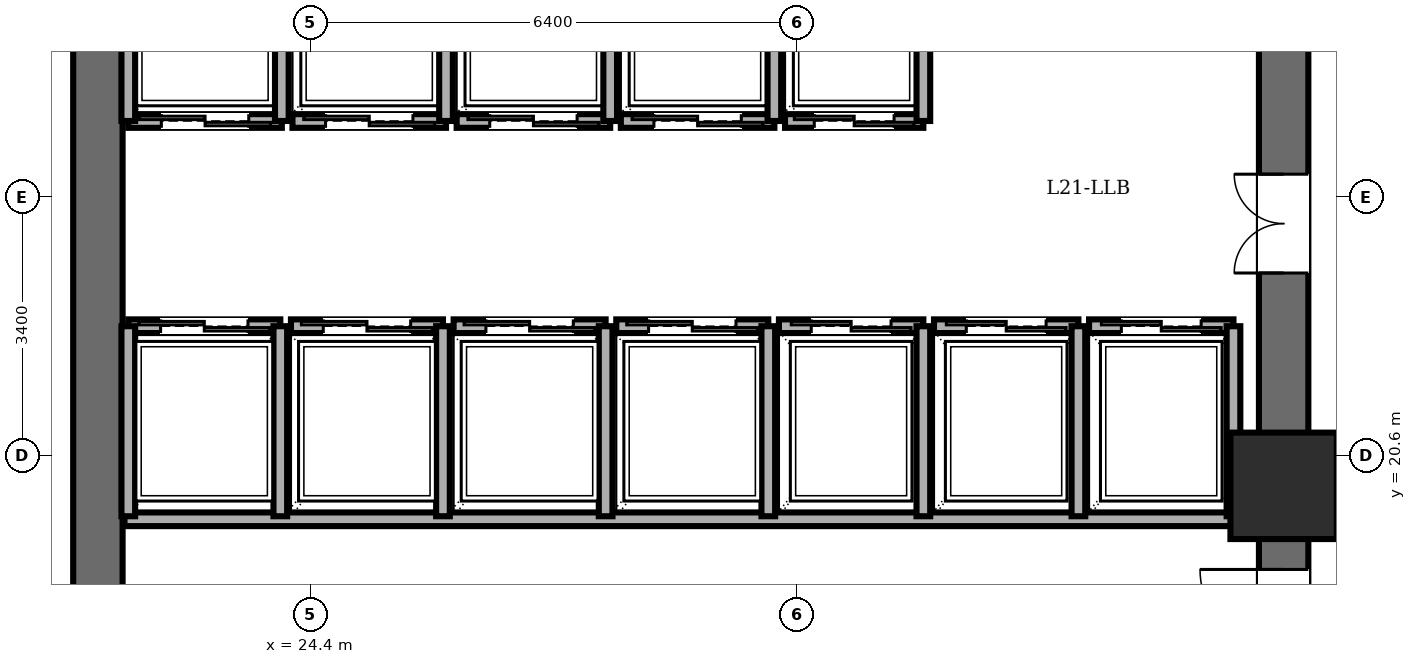
"""IFC4 building model, lengths in metres.
Left out: names, types, materials, properties, quantities, classifications, styles, units other than length and angle.
Written with IfcOpenShell. Run it as: python <this file> out.ifc"""

import sys

from ifc_helpers import new_model, si_unit, direction, frame, frame_2d, origin, origin_2d, place, context, subcontext, project, spatial, rectangle, extrude, element, fill, save


model = new_model("IFC4")
c1 = context("Model", 3, precision=1e-05, world=origin(), true_north=direction((0.0, 1.0)))
c2 = subcontext(c1, "Body", "Model", "MODEL_VIEW")
j1 = project(units=[si_unit("LENGTHUNIT", "METRE"), si_unit("PLANEANGLEUNIT", "RADIAN")], contexts=[c1])
p1 = place(None, origin())
s1 = spatial("IfcSite", under=j1, at=p1, CompositionType="ELEMENT")
p2 = place(p1, origin())
s2 = spatial("IfcBuilding", under=s1, at=p2, CompositionType="ELEMENT")
p3 = place(p2, frame((0.0, 0.0, 81.2)))
s3 = spatial("IfcBuildingStorey", under=s2, at=p3, CompositionType="ELEMENT", Elevation=81.2)
p4 = place(p3, frame((37.2, 20.2, 0.0), z_axis=(0.0, 0.0, 1.0), x_axis=(1.0, 0.0, 0.0)))
e1 = element("IfcColumn", 1, at=p4, inside=s3, PredefinedType="COLUMN", context=c2, shape_type="SweptSolid", body=[
    extrude(rectangle(XDim=1.4, YDim=1.4, at=origin_2d()), origin(), (0.0, 0.0, 1.0), 5.1),
])
p5 = place(p3, frame((21.6, 14.4, 0.0), z_axis=(0.0, 0.0, 1.0), x_axis=(0.0, 1.0, 0.0)))
e2 = element("IfcWall", 2, at=p5, inside=s3, PredefinedType="SHEAR", context=c2, shape_type="SweptSolid", body=[
    extrude(rectangle(XDim=19.2, YDim=0.65, at=frame_2d((9.6, 0.0))), origin(), (0.0, 0.0, 1.0), 4.9),
])
p6 = place(p3, frame((37.2, 14.4, 0.0), z_axis=(0.0, 0.0, 1.0), x_axis=(0.0, 1.0, 0.0)))
e3 = element("IfcWall", 3, at=p6, inside=s3, PredefinedType="SHEAR", context=c2, shape_type="SweptSolid", body=[
    extrude(rectangle(XDim=19.2, YDim=0.65, at=frame_2d((9.6, 0.0))), origin(), (0.0, 0.0, 1.0), 4.9),
])
p7 = place(p6, frame((15.8, 0.0, 0.0)))
e4 = element("IfcOpeningElement", 4, at=p7, cuts=e3, PredefinedType="OPENING", context=c2, shape_type="SweptSolid", body=[
    extrude(rectangle(XDim=1.15, YDim=2.15, at=frame_2d((0.575, 1.075))), frame((0.0, 0.335, 0.0), z_axis=(0.0, -1.0, 0.0), x_axis=(1.0, 0.0, 0.0)), (0.0, 0.0, 1.0), 0.67),
])
p8 = place(p6, frame((3.6, 0.0, 0.0)))
e5 = element("IfcOpeningElement", 5, at=p8, cuts=e3, PredefinedType="OPENING", context=c2, shape_type="SweptSolid", body=[
    extrude(rectangle(XDim=1.1, YDim=2.15, at=frame_2d((0.55, 1.075))), frame((0.0, 0.335, 0.0), z_axis=(0.0, -1.0, 0.0), x_axis=(1.0, 0.0, 0.0)), (0.0, 0.0, 1.0), 0.67),
])
p9 = place(p6, frame((8.6, 0.0, 0.0)))
e6 = element("IfcOpeningElement", 6, at=p9, cuts=e3, PredefinedType="OPENING", context=c2, shape_type="SweptSolid", body=[
    extrude(rectangle(XDim=1.3, YDim=2.2, at=frame_2d((0.65, 1.1))), frame((0.0, 0.335, 0.0), z_axis=(0.0, -1.0, 0.0), x_axis=(1.0, 0.0, 0.0)), (0.0, 0.0, 1.0), 0.67),
])
p10 = place(p3, frame((21.95, 19.76, 0.0), z_axis=(0.0, 0.0, 1.0), x_axis=(1.0, 0.0, 0.0)))
e7 = element("IfcWall", 7, at=p10, inside=s3, PredefinedType="PARTITIONING", context=c2, shape_type="SweptSolid", body=[
    extrude(rectangle(XDim=14.87, YDim=0.18, at=frame_2d((7.435, 0.0))), origin(), (0.0, 0.0, 1.0), 4.9),
])
p11 = place(p3, frame((24.02, 25.0, 0.0), z_axis=(0.0, 0.0, 1.0), x_axis=(-1.0, 0.0, 0.0)))
e8 = element("IfcWall", 8, at=p11, inside=s3, PredefinedType="PARTITIONING", context=c2, shape_type="SweptSolid", body=[
    extrude(rectangle(XDim=2.02, YDim=0.18, at=frame_2d((1.01, 0.0))), origin(), (0.0, 0.0, 1.0), 4.9),
])
p12 = place(p11, frame((0.435, 0.0, 0.0)))
e9 = element("IfcOpeningElement", 9, at=p12, cuts=e8, PredefinedType="OPENING", context=c2, shape_type="SweptSolid", body=[
    extrude(rectangle(XDim=1.15, YDim=2.2, at=frame_2d((0.575, 1.1))), frame((0.0, 0.1, 0.0), z_axis=(0.0, -1.0, 0.0), x_axis=(1.0, 0.0, 0.0)), (0.0, 0.0, 1.0), 0.2),
])
for number, where, z_axis, x_axis in (
    (10, (24.02, 25.0, 0.0), (0.0, 0.0, 1.0), (0.0, 1.0, 0.0)),
    (11, (22.0, 27.5, 0.0), (0.0, 0.0, 1.0), (0.0, -1.0, 0.0)),
):
    element("IfcWall", number, at=place(p3, frame(where, z_axis=z_axis, x_axis=x_axis)), inside=s3, PredefinedType="PARTITIONING", context=c2, shape_type="SweptSolid", body=[
        extrude(rectangle(XDim=2.5, YDim=0.18, at=frame_2d((1.25, 0.0))), origin(), (0.0, 0.0, 1.0), 4.9),
    ])
p13 = place(p3, frame((26.18, 25.0, 0.0), z_axis=(0.0, 0.0, 1.0), x_axis=(-1.0, 0.0, 0.0)))
e12 = element("IfcWall", 12, at=p13, inside=s3, PredefinedType="PARTITIONING", context=c2, shape_type="SweptSolid", body=[
    extrude(rectangle(XDim=2.02, YDim=0.18, at=frame_2d((1.01, 0.0))), origin(), (0.0, 0.0, 1.0), 4.9),
])
p14 = place(p13, frame((0.435, 0.0, 0.0)))
e13 = element("IfcOpeningElement", 13, at=p14, cuts=e12, PredefinedType="OPENING", context=c2, shape_type="SweptSolid", body=[
    extrude(rectangle(XDim=1.15, YDim=2.2, at=frame_2d((0.575, 1.1))), frame((0.0, 0.1, 0.0), z_axis=(0.0, -1.0, 0.0), x_axis=(1.0, 0.0, 0.0)), (0.0, 0.0, 1.0), 0.2),
])
p15 = place(p3, frame((26.18, 25.0, 0.0), z_axis=(0.0, 0.0, 1.0), x_axis=(0.0, 1.0, 0.0)))
e14 = element("IfcWall", 14, at=p15, inside=s3, PredefinedType="PARTITIONING", context=c2, shape_type="SweptSolid", body=[
    extrude(rectangle(XDim=2.5, YDim=0.18, at=frame_2d((1.25, 0.0))), origin(), (0.0, 0.0, 1.0), 4.9),
])
p16 = place(p3, frame((22.0, 22.3, 0.0), z_axis=(0.0, 0.0, 1.0), x_axis=(1.0, 0.0, 0.0)))
e15 = element("IfcWall", 15, at=p16, inside=s3, PredefinedType="PARTITIONING", context=c2, shape_type="SweptSolid", body=[
    extrude(rectangle(XDim=2.0, YDim=0.18, at=frame_2d((1.0, 0.0))), origin(), (0.0, 0.0, 1.0), 4.9),
])
p17 = place(p16, frame((0.425, 0.0, 0.0)))
e16 = element("IfcOpeningElement", 16, at=p17, cuts=e15, PredefinedType="OPENING", context=c2, shape_type="SweptSolid", body=[
    extrude(rectangle(XDim=1.15, YDim=2.2, at=frame_2d((0.575, 1.1))), frame((0.0, 0.1, 0.0), z_axis=(0.0, -1.0, 0.0), x_axis=(1.0, 0.0, 0.0)), (0.0, 0.0, 1.0), 0.2),
])
for number, where, z_axis, x_axis in (
    (17, (24.0, 19.8, 0.0), (0.0, 0.0, 1.0), (0.0, 1.0, 0.0)),
    (18, (22.0, 22.3, 0.0), (0.0, 0.0, 1.0), (0.0, -1.0, 0.0)),
):
    element("IfcWall", number, at=place(p3, frame(where, z_axis=z_axis, x_axis=x_axis)), inside=s3, PredefinedType="PARTITIONING", context=c2, shape_type="SweptSolid", body=[
        extrude(rectangle(XDim=2.5, YDim=0.18, at=frame_2d((1.25, 0.0))), origin(), (0.0, 0.0, 1.0), 4.9),
    ])
p18 = place(p3, frame((24.14, 22.3, 0.0), z_axis=(0.0, 0.0, 1.0), x_axis=(1.0, 0.0, 0.0)))
e19 = element("IfcWall", 19, at=p18, inside=s3, PredefinedType="PARTITIONING", context=c2, shape_type="SweptSolid", body=[
    extrude(rectangle(XDim=2.0, YDim=0.18, at=frame_2d((1.0, 0.0))), origin(), (0.0, 0.0, 1.0), 4.9),
])
p19 = place(p18, frame((0.425, 0.0, 0.0)))
e20 = element("IfcOpeningElement", 20, at=p19, cuts=e19, PredefinedType="OPENING", context=c2, shape_type="SweptSolid", body=[
    extrude(rectangle(XDim=1.15, YDim=2.2, at=frame_2d((0.575, 1.1))), frame((0.0, 0.1, 0.0), z_axis=(0.0, -1.0, 0.0), x_axis=(1.0, 0.0, 0.0)), (0.0, 0.0, 1.0), 0.2),
])
p20 = place(p3, frame((26.14, 19.8, 0.0), z_axis=(0.0, 0.0, 1.0), x_axis=(0.0, 1.0, 0.0)))
e21 = element("IfcWall", 21, at=p20, inside=s3, PredefinedType="PARTITIONING", context=c2, shape_type="SweptSolid", body=[
    extrude(rectangle(XDim=2.5, YDim=0.18, at=frame_2d((1.25, 0.0))), origin(), (0.0, 0.0, 1.0), 4.9),
])
p21 = place(p3, frame((28.34, 25.0, 0.0), z_axis=(0.0, 0.0, 1.0), x_axis=(-1.0, 0.0, 0.0)))
e22 = element("IfcWall", 22, at=p21, inside=s3, PredefinedType="PARTITIONING", context=c2, shape_type="SweptSolid", body=[
    extrude(rectangle(XDim=2.02, YDim=0.18, at=frame_2d((1.01, 0.0))), origin(), (0.0, 0.0, 1.0), 4.9),
])
p22 = place(p21, frame((0.435, 0.0, 0.0)))
e23 = element("IfcOpeningElement", 23, at=p22, cuts=e22, PredefinedType="OPENING", context=c2, shape_type="SweptSolid", body=[
    extrude(rectangle(XDim=1.15, YDim=2.2, at=frame_2d((0.575, 1.1))), frame((0.0, 0.1, 0.0), z_axis=(0.0, -1.0, 0.0), x_axis=(1.0, 0.0, 0.0)), (0.0, 0.0, 1.0), 0.2),
])
p23 = place(p3, frame((28.34, 25.0, 0.0), z_axis=(0.0, 0.0, 1.0), x_axis=(0.0, 1.0, 0.0)))
e24 = element("IfcWall", 24, at=p23, inside=s3, PredefinedType="PARTITIONING", context=c2, shape_type="SweptSolid", body=[
    extrude(rectangle(XDim=2.5, YDim=0.18, at=frame_2d((1.25, 0.0))), origin(), (0.0, 0.0, 1.0), 4.9),
])
p24 = place(p3, frame((30.5, 25.0, 0.0), z_axis=(0.0, 0.0, 1.0), x_axis=(-1.0, 0.0, 0.0)))
e25 = element("IfcWall", 25, at=p24, inside=s3, PredefinedType="PARTITIONING", context=c2, shape_type="SweptSolid", body=[
    extrude(rectangle(XDim=2.02, YDim=0.18, at=frame_2d((1.01, 0.0))), origin(), (0.0, 0.0, 1.0), 4.9),
])
p25 = place(p24, frame((0.435, 0.0, 0.0)))
e26 = element("IfcOpeningElement", 26, at=p25, cuts=e25, PredefinedType="OPENING", context=c2, shape_type="SweptSolid", body=[
    extrude(rectangle(XDim=1.15, YDim=2.2, at=frame_2d((0.575, 1.1))), frame((0.0, 0.1, 0.0), z_axis=(0.0, -1.0, 0.0), x_axis=(1.0, 0.0, 0.0)), (0.0, 0.0, 1.0), 0.2),
])
p26 = place(p3, frame((30.5, 25.0, 0.0), z_axis=(0.0, 0.0, 1.0), x_axis=(0.0, 1.0, 0.0)))
e27 = element("IfcWall", 27, at=p26, inside=s3, PredefinedType="PARTITIONING", context=c2, shape_type="SweptSolid", body=[
    extrude(rectangle(XDim=2.5, YDim=0.18, at=frame_2d((1.25, 0.0))), origin(), (0.0, 0.0, 1.0), 4.9),
])
p27 = place(p3, frame((26.28, 22.3, 0.0), z_axis=(0.0, 0.0, 1.0), x_axis=(1.0, 0.0, 0.0)))
e28 = element("IfcWall", 28, at=p27, inside=s3, PredefinedType="PARTITIONING", context=c2, shape_type="SweptSolid", body=[
    extrude(rectangle(XDim=2.0, YDim=0.18, at=frame_2d((1.0, 0.0))), origin(), (0.0, 0.0, 1.0), 4.9),
])
p28 = place(p27, frame((0.425, 0.0, 0.0)))
e29 = element("IfcOpeningElement", 29, at=p28, cuts=e28, PredefinedType="OPENING", context=c2, shape_type="SweptSolid", body=[
    extrude(rectangle(XDim=1.15, YDim=2.2, at=frame_2d((0.575, 1.1))), frame((0.0, 0.1, 0.0), z_axis=(0.0, -1.0, 0.0), x_axis=(1.0, 0.0, 0.0)), (0.0, 0.0, 1.0), 0.2),
])
p29 = place(p3, frame((28.28, 19.8, 0.0), z_axis=(0.0, 0.0, 1.0), x_axis=(0.0, 1.0, 0.0)))
e30 = element("IfcWall", 30, at=p29, inside=s3, PredefinedType="PARTITIONING", context=c2, shape_type="SweptSolid", body=[
    extrude(rectangle(XDim=2.5, YDim=0.18, at=frame_2d((1.25, 0.0))), origin(), (0.0, 0.0, 1.0), 4.9),
])
p30 = place(p3, frame((28.42, 22.3, 0.0), z_axis=(0.0, 0.0, 1.0), x_axis=(1.0, 0.0, 0.0)))
e31 = element("IfcWall", 31, at=p30, inside=s3, PredefinedType="PARTITIONING", context=c2, shape_type="SweptSolid", body=[
    extrude(rectangle(XDim=2.0, YDim=0.18, at=frame_2d((1.0, 0.0))), origin(), (0.0, 0.0, 1.0), 4.9),
])
p31 = place(p30, frame((0.425, 0.0, 0.0)))
e32 = element("IfcOpeningElement", 32, at=p31, cuts=e31, PredefinedType="OPENING", context=c2, shape_type="SweptSolid", body=[
    extrude(rectangle(XDim=1.15, YDim=2.2, at=frame_2d((0.575, 1.1))), frame((0.0, 0.1, 0.0), z_axis=(0.0, -1.0, 0.0), x_axis=(1.0, 0.0, 0.0)), (0.0, 0.0, 1.0), 0.2),
])
p32 = place(p3, frame((30.42, 19.8, 0.0), z_axis=(0.0, 0.0, 1.0), x_axis=(0.0, 1.0, 0.0)))
e33 = element("IfcWall", 33, at=p32, inside=s3, PredefinedType="PARTITIONING", context=c2, shape_type="SweptSolid", body=[
    extrude(rectangle(XDim=2.5, YDim=0.18, at=frame_2d((1.25, 0.0))), origin(), (0.0, 0.0, 1.0), 4.9),
])
p33 = place(p3, frame((32.46, 25.0, 0.0), z_axis=(0.0, 0.0, 1.0), x_axis=(-1.0, 0.0, 0.0)))
e34 = element("IfcWall", 34, at=p33, inside=s3, PredefinedType="PARTITIONING", context=c2, shape_type="SweptSolid", body=[
    extrude(rectangle(XDim=1.82, YDim=0.18, at=frame_2d((0.91, 0.0))), origin(), (0.0, 0.0, 1.0), 4.9),
])
p34 = place(p33, frame((0.385, 0.0, 0.0)))
e35 = element("IfcOpeningElement", 35, at=p34, cuts=e34, PredefinedType="OPENING", context=c2, shape_type="SweptSolid", body=[
    extrude(rectangle(XDim=1.05, YDim=2.2, at=frame_2d((0.525, 1.1))), frame((0.0, 0.1, 0.0), z_axis=(0.0, -1.0, 0.0), x_axis=(1.0, 0.0, 0.0)), (0.0, 0.0, 1.0), 0.2),
])
p35 = place(p3, frame((32.46, 25.0, 0.0), z_axis=(0.0, 0.0, 1.0), x_axis=(0.0, 1.0, 0.0)))
e36 = element("IfcWall", 36, at=p35, inside=s3, PredefinedType="PARTITIONING", context=c2, shape_type="SweptSolid", body=[
    extrude(rectangle(XDim=2.5, YDim=0.18, at=frame_2d((1.25, 0.0))), origin(), (0.0, 0.0, 1.0), 4.9),
])
p36 = place(p3, frame((30.56, 22.3, 0.0), z_axis=(0.0, 0.0, 1.0), x_axis=(1.0, 0.0, 0.0)))
e37 = element("IfcWall", 37, at=p36, inside=s3, PredefinedType="PARTITIONING", context=c2, shape_type="SweptSolid", body=[
    extrude(rectangle(XDim=1.9, YDim=0.18, at=frame_2d((0.95, 0.0))), origin(), (0.0, 0.0, 1.0), 4.9),
])
p37 = place(p36, frame((0.425, 0.0, 0.0)))
e38 = element("IfcOpeningElement", 38, at=p37, cuts=e37, PredefinedType="OPENING", context=c2, shape_type="SweptSolid", body=[
    extrude(rectangle(XDim=1.05, YDim=2.2, at=frame_2d((0.525, 1.1))), frame((0.0, 0.1, 0.0), z_axis=(0.0, -1.0, 0.0), x_axis=(1.0, 0.0, 0.0)), (0.0, 0.0, 1.0), 0.2),
])
p38 = place(p3, frame((32.46, 19.8, 0.0), z_axis=(0.0, 0.0, 1.0), x_axis=(0.0, 1.0, 0.0)))
e39 = element("IfcWall", 39, at=p38, inside=s3, PredefinedType="PARTITIONING", context=c2, shape_type="SweptSolid", body=[
    extrude(rectangle(XDim=2.5, YDim=0.18, at=frame_2d((1.25, 0.0))), origin(), (0.0, 0.0, 1.0), 4.9),
])
p39 = place(p3, frame((32.6, 22.3, 0.0), z_axis=(0.0, 0.0, 1.0), x_axis=(1.0, 0.0, 0.0)))
e40 = element("IfcWall", 40, at=p39, inside=s3, PredefinedType="PARTITIONING", context=c2, shape_type="SweptSolid", body=[
    extrude(rectangle(XDim=1.9, YDim=0.18, at=frame_2d((0.95, 0.0))), origin(), (0.0, 0.0, 1.0), 4.9),
])
p40 = place(p39, frame((0.425, 0.0, 0.0)))
e41 = element("IfcOpeningElement", 41, at=p40, cuts=e40, PredefinedType="OPENING", context=c2, shape_type="SweptSolid", body=[
    extrude(rectangle(XDim=1.05, YDim=2.2, at=frame_2d((0.525, 1.1))), frame((0.0, 0.1, 0.0), z_axis=(0.0, -1.0, 0.0), x_axis=(1.0, 0.0, 0.0)), (0.0, 0.0, 1.0), 0.2),
])
p41 = place(p3, frame((34.5, 19.8, 0.0), z_axis=(0.0, 0.0, 1.0), x_axis=(0.0, 1.0, 0.0)))
e42 = element("IfcWall", 42, at=p41, inside=s3, PredefinedType="PARTITIONING", context=c2, shape_type="SweptSolid", body=[
    extrude(rectangle(XDim=2.5, YDim=0.18, at=frame_2d((1.25, 0.0))), origin(), (0.0, 0.0, 1.0), 4.9),
])
p42 = place(p3, frame((34.64, 22.3, 0.0), z_axis=(0.0, 0.0, 1.0), x_axis=(1.0, 0.0, 0.0)))
e43 = element("IfcWall", 43, at=p42, inside=s3, PredefinedType="PARTITIONING", context=c2, shape_type="SweptSolid", body=[
    extrude(rectangle(XDim=1.9, YDim=0.18, at=frame_2d((0.95, 0.0))), origin(), (0.0, 0.0, 1.0), 4.9),
])
p43 = place(p42, frame((0.425, 0.0, 0.0)))
e44 = element("IfcOpeningElement", 44, at=p43, cuts=e43, PredefinedType="OPENING", context=c2, shape_type="SweptSolid", body=[
    extrude(rectangle(XDim=1.05, YDim=2.2, at=frame_2d((0.525, 1.1))), frame((0.0, 0.1, 0.0), z_axis=(0.0, -1.0, 0.0), x_axis=(1.0, 0.0, 0.0)), (0.0, 0.0, 1.0), 0.2),
])
p44 = place(p3, frame((36.54, 19.8, 0.0), z_axis=(0.0, 0.0, 1.0), x_axis=(0.0, 1.0, 0.0)))
e45 = element("IfcWall", 45, at=p44, inside=s3, PredefinedType="PARTITIONING", context=c2, shape_type="SweptSolid", body=[
    extrude(rectangle(XDim=2.5, YDim=0.18, at=frame_2d((1.25, 0.0))), origin(), (0.0, 0.0, 1.0), 4.9),
])
p45 = place(p8, origin())
e46 = element("IfcDoor", 46, at=p45, inside=s3, OperationType="SINGLE_SWING_RIGHT", PredefinedType="DOOR", context=c2, shape_type="SweptSolid", body=[
    extrude(rectangle(XDim=1.1, YDim=2.15, at=frame_2d((0.55, 1.075))), frame((0.0, 0.025, 0.0), z_axis=(0.0, -1.0, 0.0), x_axis=(1.0, 0.0, 0.0)), (0.0, 0.0, 1.0), 0.05),
])
fill(e5, e46)
p46 = place(p12, origin())
e47 = element("IfcDoor", 47, at=p46, inside=s3, OperationType="DOUBLE_DOOR_SLIDING", PredefinedType="DOOR", context=c2, shape_type="SweptSolid", body=[
    extrude(rectangle(XDim=1.15, YDim=2.2, at=frame_2d((0.575, 1.1))), frame((0.0, 0.025, 0.0), z_axis=(0.0, -1.0, 0.0), x_axis=(1.0, 0.0, 0.0)), (0.0, 0.0, 1.0), 0.05),
])
fill(e9, e47)
p47 = place(p14, origin())
e48 = element("IfcDoor", 48, at=p47, inside=s3, OperationType="DOUBLE_DOOR_SLIDING", PredefinedType="DOOR", context=c2, shape_type="SweptSolid", body=[
    extrude(rectangle(XDim=1.15, YDim=2.2, at=frame_2d((0.575, 1.1))), frame((0.0, 0.025, 0.0), z_axis=(0.0, -1.0, 0.0), x_axis=(1.0, 0.0, 0.0)), (0.0, 0.0, 1.0), 0.05),
])
fill(e13, e48)
p48 = place(p17, origin())
e49 = element("IfcDoor", 49, at=p48, inside=s3, OperationType="DOUBLE_DOOR_SLIDING", PredefinedType="DOOR", context=c2, shape_type="SweptSolid", body=[
    extrude(rectangle(XDim=1.15, YDim=2.2, at=frame_2d((0.575, 1.1))), frame((0.0, 0.025, 0.0), z_axis=(0.0, -1.0, 0.0), x_axis=(1.0, 0.0, 0.0)), (0.0, 0.0, 1.0), 0.05),
])
fill(e16, e49)
p49 = place(p19, origin())
e50 = element("IfcDoor", 50, at=p49, inside=s3, OperationType="DOUBLE_DOOR_SLIDING", PredefinedType="DOOR", context=c2, shape_type="SweptSolid", body=[
    extrude(rectangle(XDim=1.15, YDim=2.2, at=frame_2d((0.575, 1.1))), frame((0.0, 0.025, 0.0), z_axis=(0.0, -1.0, 0.0), x_axis=(1.0, 0.0, 0.0)), (0.0, 0.0, 1.0), 0.05),
])
fill(e20, e50)
p50 = place(p22, origin())
e51 = element("IfcDoor", 51, at=p50, inside=s3, OperationType="DOUBLE_DOOR_SLIDING", PredefinedType="DOOR", context=c2, shape_type="SweptSolid", body=[
    extrude(rectangle(XDim=1.15, YDim=2.2, at=frame_2d((0.575, 1.1))), frame((0.0, 0.025, 0.0), z_axis=(0.0, -1.0, 0.0), x_axis=(1.0, 0.0, 0.0)), (0.0, 0.0, 1.0), 0.05),
])
fill(e23, e51)
p51 = place(p25, origin())
e52 = element("IfcDoor", 52, at=p51, inside=s3, OperationType="DOUBLE_DOOR_SLIDING", PredefinedType="DOOR", context=c2, shape_type="SweptSolid", body=[
    extrude(rectangle(XDim=1.15, YDim=2.2, at=frame_2d((0.575, 1.1))), frame((0.0, 0.025, 0.0), z_axis=(0.0, -1.0, 0.0), x_axis=(1.0, 0.0, 0.0)), (0.0, 0.0, 1.0), 0.05),
])
fill(e26, e52)
p52 = place(p28, origin())
e53 = element("IfcDoor", 53, at=p52, inside=s3, OperationType="DOUBLE_DOOR_SLIDING", PredefinedType="DOOR", context=c2, shape_type="SweptSolid", body=[
    extrude(rectangle(XDim=1.15, YDim=2.2, at=frame_2d((0.575, 1.1))), frame((0.0, 0.025, 0.0), z_axis=(0.0, -1.0, 0.0), x_axis=(1.0, 0.0, 0.0)), (0.0, 0.0, 1.0), 0.05),
])
fill(e29, e53)
p53 = place(p31, origin())
e54 = element("IfcDoor", 54, at=p53, inside=s3, OperationType="DOUBLE_DOOR_SLIDING", PredefinedType="DOOR", context=c2, shape_type="SweptSolid", body=[
    extrude(rectangle(XDim=1.15, YDim=2.2, at=frame_2d((0.575, 1.1))), frame((0.0, 0.025, 0.0), z_axis=(0.0, -1.0, 0.0), x_axis=(1.0, 0.0, 0.0)), (0.0, 0.0, 1.0), 0.05),
])
fill(e32, e54)
p54 = place(p34, origin())
e55 = element("IfcDoor", 55, at=p54, inside=s3, OperationType="DOUBLE_DOOR_SLIDING", PredefinedType="DOOR", context=c2, shape_type="SweptSolid", body=[
    extrude(rectangle(XDim=1.05, YDim=2.2, at=frame_2d((0.525, 1.1))), frame((0.0, 0.025, 0.0), z_axis=(0.0, -1.0, 0.0), x_axis=(1.0, 0.0, 0.0)), (0.0, 0.0, 1.0), 0.05),
])
fill(e35, e55)
p55 = place(p37, origin())
e56 = element("IfcDoor", 56, at=p55, inside=s3, OperationType="DOUBLE_DOOR_SLIDING", PredefinedType="DOOR", context=c2, shape_type="SweptSolid", body=[
    extrude(rectangle(XDim=1.05, YDim=2.2, at=frame_2d((0.525, 1.1))), frame((0.0, 0.025, 0.0), z_axis=(0.0, -1.0, 0.0), x_axis=(1.0, 0.0, 0.0)), (0.0, 0.0, 1.0), 0.05),
])
fill(e38, e56)
p56 = place(p40, origin())
e57 = element("IfcDoor", 57, at=p56, inside=s3, OperationType="DOUBLE_DOOR_SLIDING", PredefinedType="DOOR", context=c2, shape_type="SweptSolid", body=[
    extrude(rectangle(XDim=1.05, YDim=2.2, at=frame_2d((0.525, 1.1))), frame((0.0, 0.025, 0.0), z_axis=(0.0, -1.0, 0.0), x_axis=(1.0, 0.0, 0.0)), (0.0, 0.0, 1.0), 0.05),
])
fill(e41, e57)
p57 = place(p43, origin())
e58 = element("IfcDoor", 58, at=p57, inside=s3, OperationType="DOUBLE_DOOR_SLIDING", PredefinedType="DOOR", context=c2, shape_type="SweptSolid", body=[
    extrude(rectangle(XDim=1.05, YDim=2.2, at=frame_2d((0.525, 1.1))), frame((0.0, 0.025, 0.0), z_axis=(0.0, -1.0, 0.0), x_axis=(1.0, 0.0, 0.0)), (0.0, 0.0, 1.0), 0.05),
])
fill(e44, e58)
p58 = place(p9, origin())
e59 = element("IfcDoor", 59, at=p58, inside=s3, OperationType="DOUBLE_DOOR_SINGLE_SWING", PredefinedType="DOOR", context=c2, shape_type="SweptSolid", body=[
    extrude(rectangle(XDim=1.3, YDim=2.2, at=frame_2d((0.65, 1.1))), frame((0.0, 0.025, 0.0), z_axis=(0.0, -1.0, 0.0), x_axis=(1.0, 0.0, 0.0)), (0.0, 0.0, 1.0), 0.05),
])
fill(e6, e59)
save(model, sys.argv[1])
